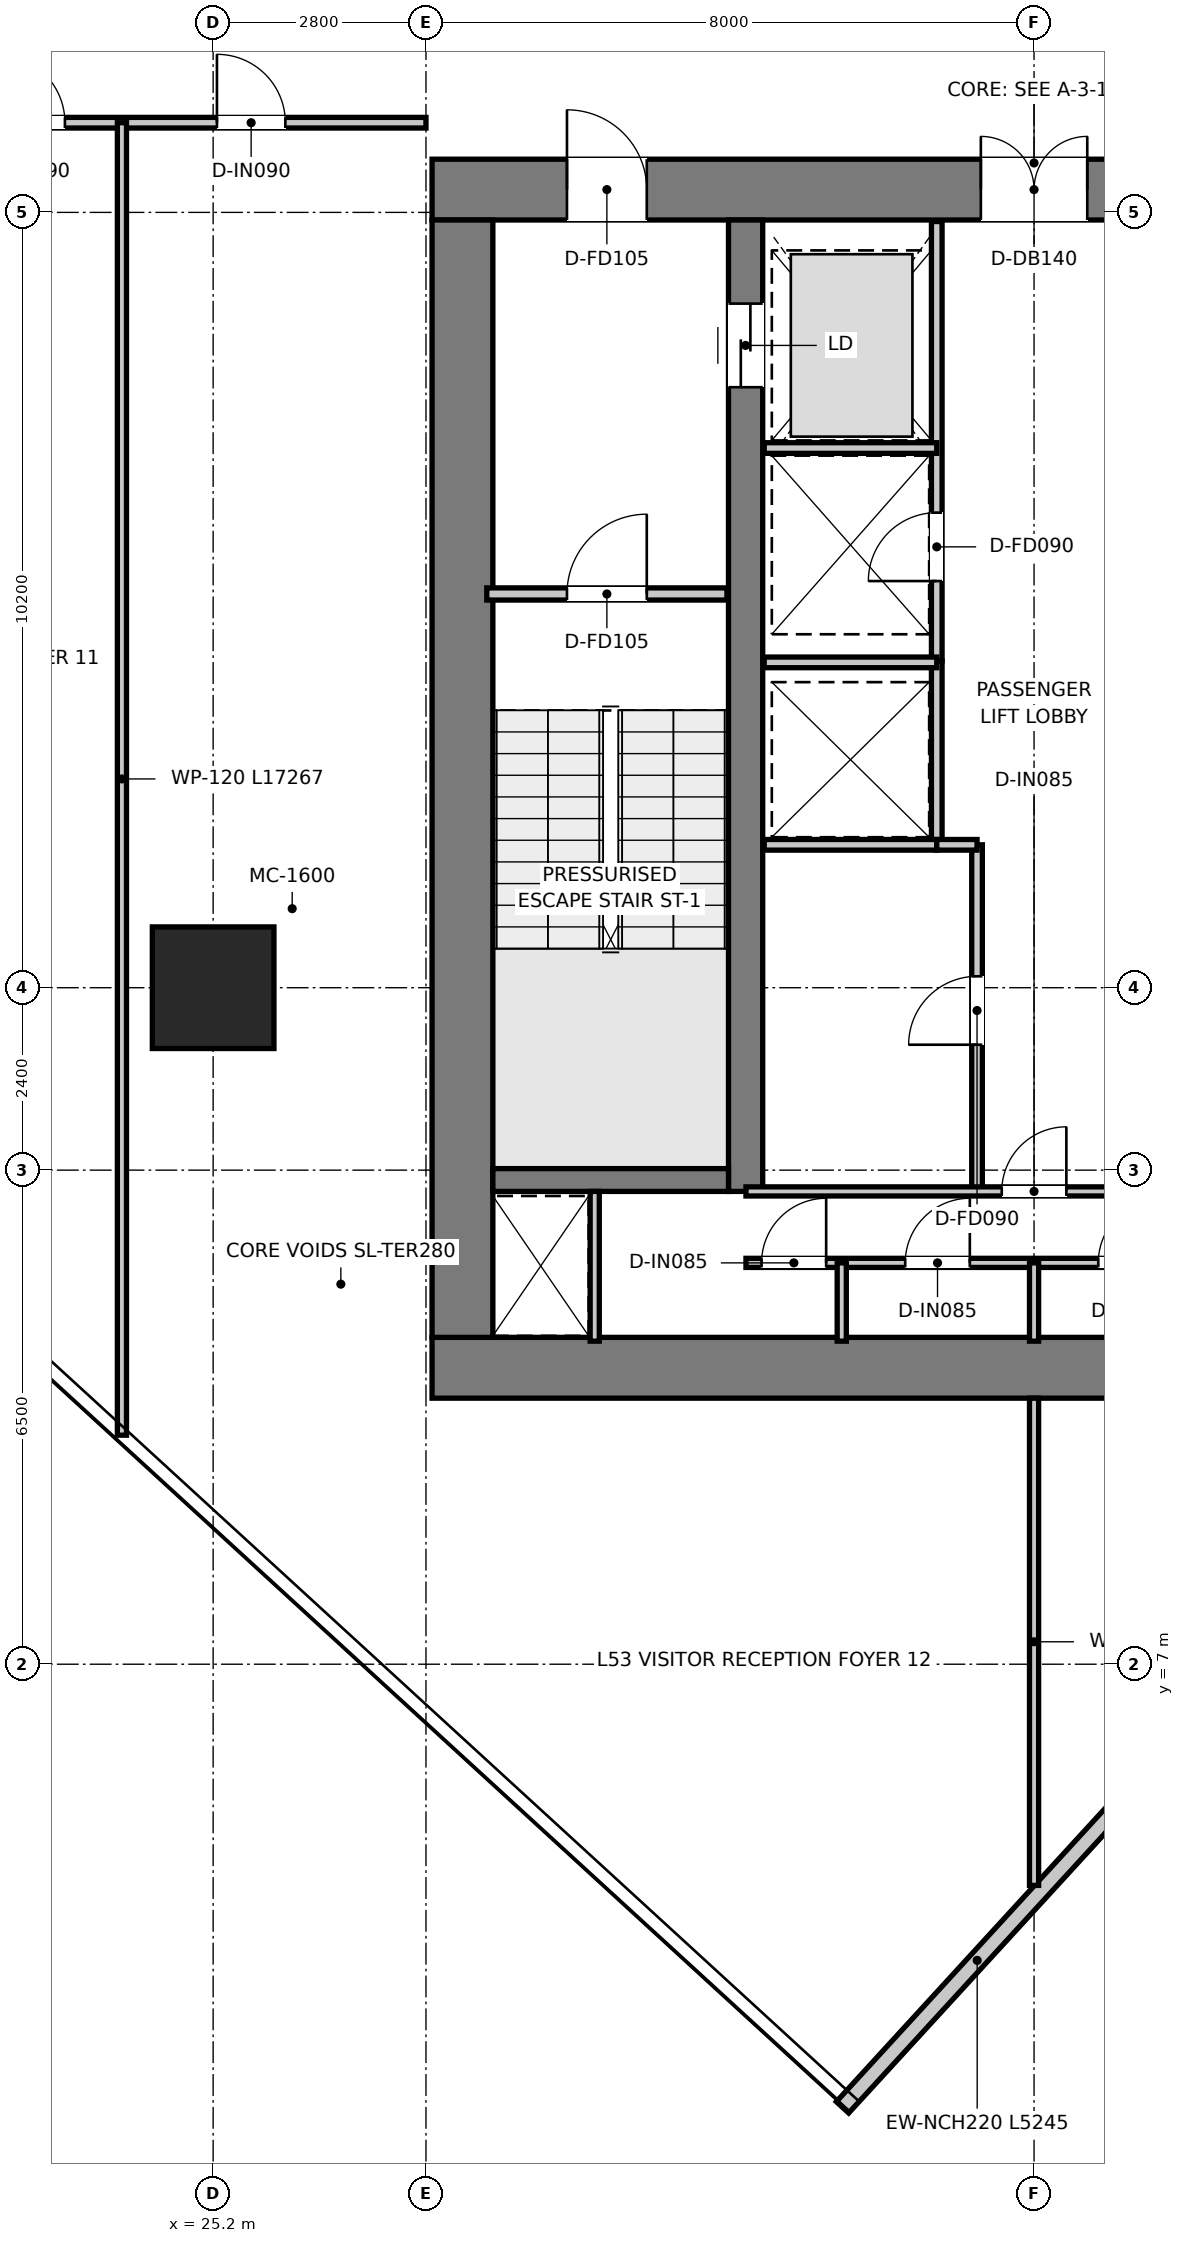
"""IFC4 building model, lengths in metres.
Left out: names, types, materials, properties, quantities, classifications, styles, units other than length and angle.
Written with IfcOpenShell. Run it as: python <this file> out.ifc"""

import sys

from ifc_helpers import new_model, si_unit, direction, frame, frame_2d, origin, origin_2d, place, context, subcontext, project, spatial, rectangle, extrude, source, transform, mapped, element, fill, save


model = new_model("IFC4")
c1 = context("Model", 3, precision=1e-05, world=origin(), true_north=direction((0.0, 1.0)))
c2 = subcontext(c1, "Body", "Model", "MODEL_VIEW")
j1 = project(units=[si_unit("LENGTHUNIT", "METRE"), si_unit("PLANEANGLEUNIT", "RADIAN")], contexts=[c1])
p1 = place(None, origin())
s1 = spatial("IfcSite", under=j1, at=p1, CompositionType="ELEMENT")
p2 = place(p1, origin())
s2 = spatial("IfcBuilding", under=s1, at=p2, CompositionType="ELEMENT")
p3 = place(p2, frame((0.0, 0.0, 219.15)))
s3 = spatial("IfcBuildingStorey", under=s2, at=p3, CompositionType="ELEMENT", Elevation=219.15)
p4 = place(p3, frame((28.08, 10.9, 0.0), z_axis=(0.0, 0.0, 1.0), x_axis=(1.0, 0.0, 0.0)))
e1 = element("IfcWall", 1, at=p4, inside=s3, PredefinedType="SHEAR", context=c2, shape_type="SweptSolid", body=[
    extrude(rectangle(XDim=15.84, YDim=0.8, at=frame_2d((7.92, 0.0))), origin(), (0.0, 0.0, 1.0), 3.95),
])
p5 = place(p3, frame((28.08, 26.4, 0.0), z_axis=(0.0, 0.0, 1.0), x_axis=(1.0, 0.0, 0.0)))
e2 = element("IfcWall", 2, at=p5, inside=s3, PredefinedType="SHEAR", context=c2, shape_type="SweptSolid", body=[
    extrude(rectangle(XDim=15.84, YDim=0.8, at=frame_2d((7.92, 0.0))), origin(), (0.0, 0.0, 1.0), 3.95),
])
p6 = place(p5, frame((7.22, 0.0, 0.0)))
e3 = element("IfcOpeningElement", 3, at=p6, cuts=e2, PredefinedType="OPENING", context=c2, shape_type="SweptSolid", body=[
    extrude(rectangle(XDim=1.4, YDim=2.2, at=frame_2d((0.7, 1.1))), frame((0.0, 0.41, 0.0), z_axis=(0.0, -1.0, 0.0), x_axis=(1.0, 0.0, 0.0)), (0.0, 0.0, 1.0), 0.82),
])
p7 = place(p5, frame((1.775, 0.0, 0.0)))
e4 = element("IfcOpeningElement", 4, at=p7, cuts=e2, PredefinedType="OPENING", context=c2, shape_type="SweptSolid", body=[
    extrude(rectangle(XDim=1.05, YDim=2.1, at=frame_2d((0.525, 1.05))), frame((0.0, 0.41, 0.0), z_axis=(0.0, -1.0, 0.0), x_axis=(1.0, 0.0, 0.0)), (0.0, 0.0, 1.0), 0.82),
])
p8 = place(p5, frame((13.015, 0.0, 0.0)))
e5 = element("IfcOpeningElement", 5, at=p8, cuts=e2, PredefinedType="OPENING", context=c2, shape_type="SweptSolid", body=[
    extrude(rectangle(XDim=1.05, YDim=2.1, at=frame_2d((0.525, 1.05))), frame((0.0, 0.41, 0.0), z_axis=(0.0, -1.0, 0.0), x_axis=(1.0, 0.0, 0.0)), (0.0, 0.0, 1.0), 0.82),
])
p9 = place(p3, frame((28.48, 11.3, 0.0), z_axis=(0.0, 0.0, 1.0), x_axis=(0.0, 1.0, 0.0)))
e6 = element("IfcWall", 6, at=p9, inside=s3, PredefinedType="SHEAR", context=c2, shape_type="SweptSolid", body=[
    extrude(rectangle(XDim=14.7, YDim=0.8, at=frame_2d((7.35, 0.0))), origin(), (0.0, 0.0, 1.0), 3.95),
])
p10 = place(p3, frame((32.205, 13.22, 0.0), z_axis=(0.0, 0.0, 1.0), x_axis=(0.0, 1.0, 0.0)))
e7 = element("IfcWall", 7, at=p10, inside=s3, PredefinedType="SHEAR", context=c2, shape_type="SweptSolid", body=[
    extrude(rectangle(XDim=12.78, YDim=0.45, at=frame_2d((6.39, 0.0))), origin(), (0.0, 0.0, 1.0), 3.95),
])
p11 = place(p10, frame((10.58, 0.0, 0.0)))
e8 = element("IfcOpeningElement", 8, at=p11, cuts=e7, PredefinedType="OPENING", context=c2, shape_type="SweptSolid", body=[
    extrude(rectangle(XDim=1.1, YDim=2.15, at=frame_2d((0.55, 1.075))), frame((0.0, 0.235, 0.0), z_axis=(0.0, -1.0, 0.0), x_axis=(1.0, 0.0, 0.0)), (0.0, 0.0, 1.0), 0.47),
])
p12 = place(p3, frame((28.88, 13.37, 0.0), z_axis=(0.0, 0.0, 1.0), x_axis=(1.0, 0.0, 0.0)))
e9 = element("IfcWall", 9, at=p12, inside=s3, PredefinedType="SHEAR", context=c2, shape_type="SweptSolid", body=[
    extrude(rectangle(XDim=3.1, YDim=0.3, at=frame_2d((1.55, 0.0))), origin(), (0.0, 0.0, 1.0), 3.95),
])
m1 = source(origin(), c2, "Body", "SweptSolid", [
    extrude(rectangle(XDim=1.6, YDim=1.6, at=origin_2d()), origin(), (0.0, 0.0, 1.0), 3.95),
])
p13 = place(p3, frame((25.2, 15.9, 0.0), z_axis=(0.0, 0.0, 1.0), x_axis=(1.0, 0.0, 0.0)))
e10 = element("IfcColumn", 10, at=p13, inside=s3, PredefinedType="USERDEFINED", context=c2, shape_type="MappedRepresentation", body=[
    mapped(m1, transform((0.0, 0.0, 0.0), x_axis=(1.0, 0.0, 0.0), y_axis=(0.0, 1.0, 0.0), z_axis=(0.0, 0.0, 1.0), scale=1.0)),
])
p14 = place(p3, frame((33.48, 1.17, 0.0), z_axis=(0.0, 0.0, 1.0), x_axis=(0.675596040677, 0.737271991752, 0.0)))
e11 = element("IfcWall", 11, at=p14, inside=s3, PredefinedType="ELEMENTEDWALL", context=c2, shape_type="SweptSolid", body=[
    extrude(rectangle(XDim=5.245, YDim=0.22, at=frame_2d((2.623, 0.0))), origin(), (0.0, 0.0, 1.0), 3.67),
])
p15 = place(p3, frame((28.8, 21.08, 0.0), z_axis=(0.0, 0.0, 1.0), x_axis=(1.0, 0.0, 0.0)))
e12 = element("IfcWall", 12, at=p15, inside=s3, PredefinedType="PARTITIONING", context=c2, shape_type="SweptSolid", body=[
    extrude(rectangle(XDim=3.16, YDim=0.16, at=frame_2d((1.58, 0.0))), origin(), (0.0, 0.0, 1.0), 3.67),
])
p16 = place(p15, frame((1.055, 0.0, 0.0)))
e13 = element("IfcOpeningElement", 13, at=p16, cuts=e12, PredefinedType="OPENING", context=c2, shape_type="SweptSolid", body=[
    extrude(rectangle(XDim=1.05, YDim=2.1, at=frame_2d((0.525, 1.05))), frame((0.0, 0.09, 0.0), z_axis=(0.0, -1.0, 0.0), x_axis=(1.0, 0.0, 0.0)), (0.0, 0.0, 1.0), 0.18),
])
p17 = place(p3, frame((34.72, 20.2, 0.0), z_axis=(0.0, 0.0, 1.0), x_axis=(0.0, 1.0, 0.0)))
e14 = element("IfcWall", 14, at=p17, inside=s3, PredefinedType="PARTITIONING", context=c2, shape_type="SweptSolid", body=[
    extrude(rectangle(XDim=5.78, YDim=0.14, at=frame_2d((2.89, 0.0))), origin(), (0.0, 0.0, 1.0), 2.67),
])
p18 = place(p17, frame((1.05, 0.0, 0.0)))
e15 = element("IfcOpeningElement", 15, at=p18, cuts=e14, PredefinedType="OPENING", context=c2, shape_type="SweptSolid", body=[
    extrude(rectangle(XDim=0.9, YDim=2.1, at=frame_2d((0.45, 1.05))), frame((0.0, 0.08, 0.0), z_axis=(0.0, -1.0, 0.0), x_axis=(1.0, 0.0, 0.0)), (0.0, 0.0, 1.0), 0.16),
])
p19 = place(p3, frame((32.45, 23.0, 0.0), z_axis=(0.0, 0.0, 1.0), x_axis=(1.0, 0.0, 0.0)))
e16 = element("IfcWall", 16, at=p19, inside=s3, PredefinedType="PARTITIONING", context=c2, shape_type="SweptSolid", body=[
    extrude(rectangle(XDim=2.27, YDim=0.14, at=frame_2d((1.135, 0.0))), origin(), (0.0, 0.0, 1.0), 2.67),
])
p20 = place(p3, frame((34.72, 17.78, 0.0), z_axis=(0.0, 0.0, 1.0), x_axis=(0.0, 1.0, 0.0)))
e17 = element("IfcWall", 17, at=p20, inside=s3, PredefinedType="PARTITIONING", context=c2, shape_type="SweptSolid", body=[
    extrude(rectangle(XDim=2.42, YDim=0.14, at=frame_2d((1.21, 0.0))), origin(), (0.0, 0.0, 1.0), 3.67),
])
for number, where, z_axis, x_axis in (
    (18, (32.45, 17.78, 0.0), (0.0, 0.0, 1.0), (1.0, 0.0, 0.0)),
    (19, (32.45, 20.18, 0.0), (0.0, 0.0, 1.0), (1.0, 0.0, 0.0)),
):
    element("IfcWall", number, at=place(p3, frame(where, z_axis=z_axis, x_axis=x_axis)), inside=s3, PredefinedType="PARTITIONING", context=c2, shape_type="SweptSolid", body=[
        extrude(rectangle(XDim=2.27, YDim=0.14, at=frame_2d((1.135, 0.0))), origin(), (0.0, 0.0, 1.0), 3.67),
    ])
p21 = place(p3, frame((35.25, 13.22, 0.0), z_axis=(0.0, 0.0, 1.0), x_axis=(0.0, 1.0, 0.0)))
e20 = element("IfcWall", 20, at=p21, inside=s3, PredefinedType="PARTITIONING", context=c2, shape_type="SweptSolid", body=[
    extrude(rectangle(XDim=4.56, YDim=0.14, at=frame_2d((2.28, 0.0))), origin(), (0.0, 0.0, 1.0), 3.67),
])
p22 = place(p21, frame((1.93, 0.0, 0.0)))
e21 = element("IfcOpeningElement", 21, at=p22, cuts=e20, PredefinedType="OPENING", context=c2, shape_type="SweptSolid", body=[
    extrude(rectangle(XDim=0.9, YDim=2.1, at=frame_2d((0.45, 1.05))), frame((0.0, 0.08, 0.0), z_axis=(0.0, -1.0, 0.0), x_axis=(1.0, 0.0, 0.0)), (0.0, 0.0, 1.0), 0.16),
])
p23 = place(p3, frame((34.72, 17.78, 0.0), z_axis=(0.0, 0.0, 1.0), x_axis=(1.0, 0.0, 0.0)))
e22 = element("IfcWall", 22, at=p23, inside=s3, PredefinedType="PARTITIONING", context=c2, shape_type="SweptSolid", body=[
    extrude(rectangle(XDim=0.53, YDim=0.14, at=frame_2d((0.265, 0.0))), origin(), (0.0, 0.0, 1.0), 3.67),
])
p24 = place(p3, frame((30.22, 11.25, 0.0), z_axis=(0.0, 0.0, 1.0), x_axis=(0.0, 1.0, 0.0)))
e23 = element("IfcWall", 23, at=p24, inside=s3, PredefinedType="PARTITIONING", context=c2, shape_type="SweptSolid", body=[
    extrude(rectangle(XDim=1.97, YDim=0.12, at=frame_2d((0.985, 0.0))), origin(), (0.0, 0.0, 1.0), 3.67),
])
p25 = place(p3, frame((32.21, 13.22, 0.0), z_axis=(0.0, 0.0, 1.0), x_axis=(1.0, 0.0, 0.0)))
e24 = element("IfcWall", 24, at=p25, inside=s3, PredefinedType="PARTITIONING", context=c2, shape_type="SweptSolid", body=[
    extrude(rectangle(XDim=7.58, YDim=0.12, at=frame_2d((3.79, 0.0))), origin(), (0.0, 0.0, 1.0), 3.67),
])
p26 = place(p25, frame((3.365, 0.0, 0.0)))
e25 = element("IfcOpeningElement", 25, at=p26, cuts=e24, PredefinedType="OPENING", context=c2, shape_type="SweptSolid", body=[
    extrude(rectangle(XDim=0.85, YDim=2.1, at=frame_2d((0.425, 1.05))), frame((0.0, 0.07, 0.0), z_axis=(0.0, -1.0, 0.0), x_axis=(1.0, 0.0, 0.0)), (0.0, 0.0, 1.0), 0.14),
])
p27 = place(p3, frame((32.21, 12.28, 0.0), z_axis=(0.0, 0.0, 1.0), x_axis=(1.0, 0.0, 0.0)))
e26 = element("IfcWall", 26, at=p27, inside=s3, PredefinedType="PARTITIONING", context=c2, shape_type="SweptSolid", body=[
    extrude(rectangle(XDim=7.58, YDim=0.12, at=frame_2d((3.79, 0.0))), origin(), (0.0, 0.0, 1.0), 3.67),
])
p28 = place(p27, frame((0.205, 0.0, 0.0)))
e27 = element("IfcOpeningElement", 27, at=p28, cuts=e26, PredefinedType="OPENING", context=c2, shape_type="SweptSolid", body=[
    extrude(rectangle(XDim=0.85, YDim=2.1, at=frame_2d((0.425, 1.05))), frame((0.0, 0.07, 0.0), z_axis=(0.0, -1.0, 0.0), x_axis=(1.0, 0.0, 0.0)), (0.0, 0.0, 1.0), 0.14),
])
p29 = place(p27, frame((2.095, 0.0, 0.0)))
e28 = element("IfcOpeningElement", 28, at=p29, cuts=e26, PredefinedType="OPENING", context=c2, shape_type="SweptSolid", body=[
    extrude(rectangle(XDim=0.85, YDim=2.1, at=frame_2d((0.425, 1.05))), frame((0.0, 0.07, 0.0), z_axis=(0.0, -1.0, 0.0), x_axis=(1.0, 0.0, 0.0)), (0.0, 0.0, 1.0), 0.14),
])
p30 = place(p27, frame((4.635, 0.0, 0.0)))
e29 = element("IfcOpeningElement", 29, at=p30, cuts=e26, PredefinedType="OPENING", context=c2, shape_type="SweptSolid", body=[
    extrude(rectangle(XDim=0.85, YDim=2.1, at=frame_2d((0.425, 1.05))), frame((0.0, 0.07, 0.0), z_axis=(0.0, -1.0, 0.0), x_axis=(1.0, 0.0, 0.0)), (0.0, 0.0, 1.0), 0.14),
])
p31 = place(p27, frame((6.525, 0.0, 0.0)))
e30 = element("IfcOpeningElement", 30, at=p31, cuts=e26, PredefinedType="OPENING", context=c2, shape_type="SweptSolid", body=[
    extrude(rectangle(XDim=0.85, YDim=2.1, at=frame_2d((0.425, 1.05))), frame((0.0, 0.07, 0.0), z_axis=(0.0, -1.0, 0.0), x_axis=(1.0, 0.0, 0.0)), (0.0, 0.0, 1.0), 0.14),
])
for number, where, z_axis, x_axis in (
    (31, (33.47, 11.25, 0.0), (0.0, 0.0, 1.0), (0.0, 1.0, 0.0)),
    (32, (36.0, 11.25, 0.0), (0.0, 0.0, 1.0), (0.0, 1.0, 0.0)),
):
    element("IfcWall", number, at=place(p3, frame(where, z_axis=z_axis, x_axis=x_axis)), inside=s3, PredefinedType="PARTITIONING", context=c2, shape_type="SweptSolid", body=[
        extrude(rectangle(XDim=1.03, YDim=0.12, at=frame_2d((0.515, 0.0))), origin(), (0.0, 0.0, 1.0), 3.67),
    ])
p32 = place(p3, frame((12.757, 27.28, 0.0), z_axis=(0.0, 0.0, 1.0), x_axis=(1.0, 0.0, 0.0)))
e33 = element("IfcWall", 33, at=p32, inside=s3, PredefinedType="PARTITIONING", context=c2, shape_type="SweptSolid", body=[
    extrude(rectangle(XDim=15.243, YDim=0.14, at=frame_2d((7.622, 0.0))), origin(), (0.0, 0.0, 1.0), 3.03),
])
p33 = place(p32, frame((2.056, 0.0, 0.0)))
e34 = element("IfcOpeningElement", 34, at=p33, cuts=e33, PredefinedType="OPENING", context=c2, shape_type="SweptSolid", body=[
    extrude(rectangle(XDim=0.9, YDim=2.1, at=frame_2d((0.45, 1.05))), frame((0.0, 0.08, 0.0), z_axis=(0.0, -1.0, 0.0), x_axis=(1.0, 0.0, 0.0)), (0.0, 0.0, 1.0), 0.16),
])
p34 = place(p32, frame((9.593, 0.0, 0.0)))
e35 = element("IfcOpeningElement", 35, at=p34, cuts=e33, PredefinedType="OPENING", context=c2, shape_type="SweptSolid", body=[
    extrude(rectangle(XDim=0.9, YDim=2.1, at=frame_2d((0.45, 1.05))), frame((0.0, 0.08, 0.0), z_axis=(0.0, -1.0, 0.0), x_axis=(1.0, 0.0, 0.0)), (0.0, 0.0, 1.0), 0.16),
])
p35 = place(p32, frame((12.493, 0.0, 0.0)))
e36 = element("IfcOpeningElement", 36, at=p35, cuts=e33, PredefinedType="OPENING", context=c2, shape_type="SweptSolid", body=[
    extrude(rectangle(XDim=0.9, YDim=2.1, at=frame_2d((0.45, 1.05))), frame((0.0, 0.08, 0.0), z_axis=(0.0, -1.0, 0.0), x_axis=(1.0, 0.0, 0.0)), (0.0, 0.0, 1.0), 0.16),
])
p36 = place(p3, frame((36.0, 4.09, 0.0), z_axis=(0.0, 0.0, 1.0), x_axis=(0.0, 1.0, 0.0)))
e37 = element("IfcWall", 37, at=p36, inside=s3, PredefinedType="PARTITIONING", context=c2, shape_type="SweptSolid", body=[
    extrude(rectangle(XDim=6.41, YDim=0.12, at=frame_2d((3.205, 0.0))), origin(), (0.0, 0.0, 1.0), 3.67),
])
p37 = place(p3, frame((24.0, 10.013, 0.0), z_axis=(0.0, 0.0, 1.0), x_axis=(0.0, 1.0, 0.0)))
e38 = element("IfcWall", 38, at=p37, inside=s3, PredefinedType="PARTITIONING", context=c2, shape_type="SweptSolid", body=[
    extrude(rectangle(XDim=17.267, YDim=0.12, at=frame_2d((8.634, 0.0))), origin(), (0.0, 0.0, 1.0), 3.18),
])
p38 = place(p16, origin())
e39 = element("IfcDoor", 39, at=p38, inside=s3, OperationType="SINGLE_SWING_RIGHT", PredefinedType="DOOR", context=c2, shape_type="SweptSolid", body=[
    extrude(rectangle(XDim=1.05, YDim=2.1, at=frame_2d((0.525, 1.05))), frame((0.0, 0.025, 0.0), z_axis=(0.0, -1.0, 0.0), x_axis=(1.0, 0.0, 0.0)), (0.0, 0.0, 1.0), 0.05),
])
fill(e13, e39)
p39 = place(p6, origin())
e40 = element("IfcDoor", 40, at=p39, inside=s3, OperationType="DOUBLE_DOOR_SINGLE_SWING", PredefinedType="DOOR", context=c2, shape_type="SweptSolid", body=[
    extrude(rectangle(XDim=1.4, YDim=2.2, at=frame_2d((0.7, 1.1))), frame((0.0, 0.025, 0.0), z_axis=(0.0, -1.0, 0.0), x_axis=(1.0, 0.0, 0.0)), (0.0, 0.0, 1.0), 0.05),
])
fill(e3, e40)
p40 = place(p7, origin())
e41 = element("IfcDoor", 41, at=p40, inside=s3, OperationType="SINGLE_SWING_LEFT", PredefinedType="DOOR", context=c2, shape_type="SweptSolid", body=[
    extrude(rectangle(XDim=1.05, YDim=2.1, at=frame_2d((0.525, 1.05))), frame((0.0, 0.025, 0.0), z_axis=(0.0, -1.0, 0.0), x_axis=(1.0, 0.0, 0.0)), (0.0, 0.0, 1.0), 0.05),
])
fill(e4, e41)
p41 = place(p11, origin())
e42 = element("IfcDoor", 42, at=p41, inside=s3, OperationType="DOUBLE_DOOR_SLIDING", PredefinedType="DOOR", context=c2, shape_type="SweptSolid", body=[
    extrude(rectangle(XDim=1.1, YDim=2.15, at=frame_2d((0.55, 1.075))), frame((0.0, 0.025, 0.0), z_axis=(0.0, -1.0, 0.0), x_axis=(1.0, 0.0, 0.0)), (0.0, 0.0, 1.0), 0.05),
])
fill(e8, e42)
p42 = place(p18, origin())
e43 = element("IfcDoor", 43, at=p42, inside=s3, OperationType="SINGLE_SWING_LEFT", PredefinedType="DOOR", context=c2, shape_type="SweptSolid", body=[
    extrude(rectangle(XDim=0.9, YDim=2.1, at=frame_2d((0.45, 1.05))), frame((0.0, 0.025, 0.0), z_axis=(0.0, -1.0, 0.0), x_axis=(1.0, 0.0, 0.0)), (0.0, 0.0, 1.0), 0.05),
])
fill(e15, e43)
p43 = place(p22, origin())
e44 = element("IfcDoor", 44, at=p43, inside=s3, OperationType="SINGLE_SWING_LEFT", PredefinedType="DOOR", context=c2, shape_type="SweptSolid", body=[
    extrude(rectangle(XDim=0.9, YDim=2.1, at=frame_2d((0.45, 1.05))), frame((0.0, 0.025, 0.0), z_axis=(0.0, -1.0, 0.0), x_axis=(1.0, 0.0, 0.0)), (0.0, 0.0, 1.0), 0.05),
])
fill(e21, e44)
p44 = place(p26, origin())
e45 = element("IfcDoor", 45, at=p44, inside=s3, OperationType="SINGLE_SWING_RIGHT", PredefinedType="DOOR", context=c2, shape_type="SweptSolid", body=[
    extrude(rectangle(XDim=0.85, YDim=2.1, at=frame_2d((0.425, 1.05))), frame((0.0, 0.025, 0.0), z_axis=(0.0, -1.0, 0.0), x_axis=(1.0, 0.0, 0.0)), (0.0, 0.0, 1.0), 0.05),
])
fill(e25, e45)
p45 = place(p28, origin())
e46 = element("IfcDoor", 46, at=p45, inside=s3, OperationType="SINGLE_SWING_RIGHT", PredefinedType="DOOR", context=c2, shape_type="SweptSolid", body=[
    extrude(rectangle(XDim=0.85, YDim=2.1, at=frame_2d((0.425, 1.05))), frame((0.0, 0.025, 0.0), z_axis=(0.0, -1.0, 0.0), x_axis=(1.0, 0.0, 0.0)), (0.0, 0.0, 1.0), 0.05),
])
fill(e27, e46)
p46 = place(p29, origin())
e47 = element("IfcDoor", 47, at=p46, inside=s3, OperationType="SINGLE_SWING_RIGHT", PredefinedType="DOOR", context=c2, shape_type="SweptSolid", body=[
    extrude(rectangle(XDim=0.85, YDim=2.1, at=frame_2d((0.425, 1.05))), frame((0.0, 0.025, 0.0), z_axis=(0.0, -1.0, 0.0), x_axis=(1.0, 0.0, 0.0)), (0.0, 0.0, 1.0), 0.05),
])
fill(e28, e47)
p47 = place(p30, origin())
e48 = element("IfcDoor", 48, at=p47, inside=s3, OperationType="SINGLE_SWING_RIGHT", PredefinedType="DOOR", context=c2, shape_type="SweptSolid", body=[
    extrude(rectangle(XDim=0.85, YDim=2.1, at=frame_2d((0.425, 1.05))), frame((0.0, 0.025, 0.0), z_axis=(0.0, -1.0, 0.0), x_axis=(1.0, 0.0, 0.0)), (0.0, 0.0, 1.0), 0.05),
])
fill(e29, e48)
p48 = place(p34, origin())
e49 = element("IfcDoor", 49, at=p48, inside=s3, OperationType="SINGLE_SWING_LEFT", PredefinedType="DOOR", context=c2, shape_type="SweptSolid", body=[
    extrude(rectangle(XDim=0.9, YDim=2.1, at=frame_2d((0.45, 1.05))), frame((0.0, 0.025, 0.0), z_axis=(0.0, -1.0, 0.0), x_axis=(1.0, 0.0, 0.0)), (0.0, 0.0, 1.0), 0.05),
])
fill(e35, e49)
p49 = place(p35, origin())
e50 = element("IfcDoor", 50, at=p49, inside=s3, OperationType="SINGLE_SWING_LEFT", PredefinedType="DOOR", context=c2, shape_type="SweptSolid", body=[
    extrude(rectangle(XDim=0.9, YDim=2.1, at=frame_2d((0.45, 1.05))), frame((0.0, 0.025, 0.0), z_axis=(0.0, -1.0, 0.0), x_axis=(1.0, 0.0, 0.0)), (0.0, 0.0, 1.0), 0.05),
])
fill(e36, e50)
save(model, sys.argv[1])
